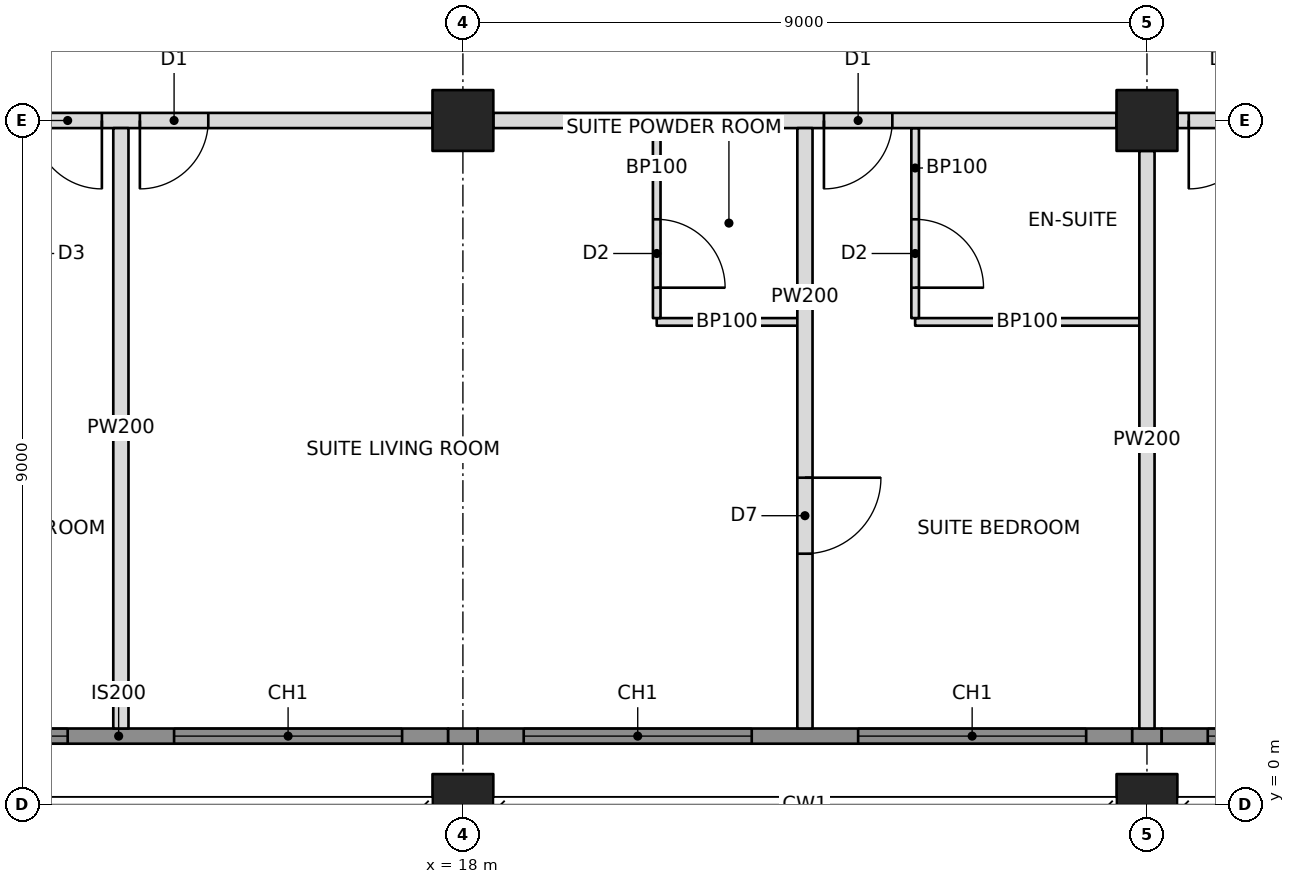
"""IFC4 building model, lengths in metres.
Left out: names, types, materials, properties, quantities, classifications, styles, units other than length and angle.
Written with IfcOpenShell. Run it as: python <this file> out.ifc"""

import sys

from ifc_helpers import new_model, si_unit, direction, frame, frame_2d, origin, origin_2d, place, context, subcontext, project, spatial, rectangle, hollow_rectangle, extrude, element, fill, save


model = new_model("IFC4")
c1 = context("Model", 3, precision=1e-05, world=origin(), true_north=direction((0.0, 1.0)))
c2 = subcontext(c1, "Body", "Model", "MODEL_VIEW")
j1 = project(units=[si_unit("LENGTHUNIT", "METRE"), si_unit("PLANEANGLEUNIT", "RADIAN")], contexts=[c1])
p1 = place(None, origin())
s1 = spatial("IfcSite", under=j1, at=p1, CompositionType="ELEMENT")
p2 = place(p1, origin())
s2 = spatial("IfcBuilding", under=s1, at=p2, CompositionType="ELEMENT")
p3 = place(p2, frame((0.0, 0.0, 201.2)))
s3 = spatial("IfcBuildingStorey", under=s2, at=p3, CompositionType="ELEMENT", Elevation=201.2)
p4 = place(p3, frame((18.0, 0.0, 0.0), z_axis=(0.0, 0.0, 1.0), x_axis=(1.0, 0.0, 0.0)))
e1 = element("IfcColumn", 1, at=p4, inside=s3, PredefinedType="COLUMN", context=c2, shape_type="SweptSolid", body=[
    extrude(hollow_rectangle(XDim=0.8, YDim=0.8, WallThickness=0.06, at=origin_2d()), origin(), (0.0, 0.0, 1.0), 3.4),
])
p5 = place(p3, frame((18.0, 9.0, 0.0), z_axis=(0.0, 0.0, 1.0), x_axis=(1.0, 0.0, 0.0)))
e2 = element("IfcColumn", 2, at=p5, inside=s3, PredefinedType="COLUMN", context=c2, shape_type="SweptSolid", body=[
    extrude(hollow_rectangle(XDim=0.8, YDim=0.8, WallThickness=0.05, at=origin_2d()), origin(), (0.0, 0.0, 1.0), 3.4),
])
p6 = place(p3, frame((27.0, 0.0, 0.0), z_axis=(0.0, 0.0, 1.0), x_axis=(1.0, 0.0, 0.0)))
e3 = element("IfcColumn", 3, at=p6, inside=s3, PredefinedType="COLUMN", context=c2, shape_type="SweptSolid", body=[
    extrude(hollow_rectangle(XDim=0.8, YDim=0.8, WallThickness=0.06, at=origin_2d()), origin(), (0.0, 0.0, 1.0), 3.4),
])
p7 = place(p3, frame((27.0, 9.0, 0.0), z_axis=(0.0, 0.0, 1.0), x_axis=(1.0, 0.0, 0.0)))
e4 = element("IfcColumn", 4, at=p7, inside=s3, PredefinedType="COLUMN", context=c2, shape_type="SweptSolid", body=[
    extrude(hollow_rectangle(XDim=0.8, YDim=0.8, WallThickness=0.05, at=origin_2d()), origin(), (0.0, 0.0, 1.0), 3.4),
])
p8 = place(p3, frame((9.4, 9.0, 0.0), z_axis=(0.0, 0.0, 1.0), x_axis=(1.0, 0.0, 0.0)))
e5 = element("IfcWall", 5, at=p8, inside=s3, PredefinedType="PARTITIONING", context=c2, shape_type="SweptSolid", body=[
    extrude(rectangle(XDim=8.2, YDim=0.2, at=frame_2d((4.1, 0.0))), origin(), (0.0, 0.0, 1.0), 2.405),
])
p9 = place(p8, frame((2.95, 0.0, 0.0)))
e6 = element("IfcOpeningElement", 6, at=p9, cuts=e5, PredefinedType="OPENING", context=c2, shape_type="SweptSolid", body=[
    extrude(rectangle(XDim=0.9, YDim=2.1, at=frame_2d((0.45, 1.05))), frame((0.0, 0.11, 0.0), z_axis=(0.0, -1.0, 0.0), x_axis=(1.0, 0.0, 0.0)), (0.0, 0.0, 1.0), 0.22),
])
p10 = place(p8, frame((4.35, 0.0, 0.0)))
e7 = element("IfcOpeningElement", 7, at=p10, cuts=e5, PredefinedType="OPENING", context=c2, shape_type="SweptSolid", body=[
    extrude(rectangle(XDim=0.9, YDim=2.1, at=frame_2d((0.45, 1.05))), frame((0.0, 0.11, 0.0), z_axis=(0.0, -1.0, 0.0), x_axis=(1.0, 0.0, 0.0)), (0.0, 0.0, 1.0), 0.22),
])
p11 = place(p3, frame((18.4, 9.0, 0.0), z_axis=(0.0, 0.0, 1.0), x_axis=(1.0, 0.0, 0.0)))
e8 = element("IfcWall", 8, at=p11, inside=s3, PredefinedType="PARTITIONING", context=c2, shape_type="SweptSolid", body=[
    extrude(rectangle(XDim=8.2, YDim=0.2, at=frame_2d((4.1, 0.0))), origin(), (0.0, 0.0, 1.0), 2.405),
])
p12 = place(p11, frame((4.35, 0.0, 0.0)))
e9 = element("IfcOpeningElement", 9, at=p12, cuts=e8, PredefinedType="OPENING", context=c2, shape_type="SweptSolid", body=[
    extrude(rectangle(XDim=0.9, YDim=2.1, at=frame_2d((0.45, 1.05))), frame((0.0, 0.11, 0.0), z_axis=(0.0, -1.0, 0.0), x_axis=(1.0, 0.0, 0.0)), (0.0, 0.0, 1.0), 0.22),
])
p13 = place(p3, frame((27.4, 9.0, 0.0), z_axis=(0.0, 0.0, 1.0), x_axis=(1.0, 0.0, 0.0)))
e10 = element("IfcWall", 10, at=p13, inside=s3, PredefinedType="PARTITIONING", context=c2, shape_type="SweptSolid", body=[
    extrude(rectangle(XDim=8.2, YDim=0.2, at=frame_2d((4.1, 0.0))), origin(), (0.0, 0.0, 1.0), 2.405),
])
p14 = place(p13, frame((0.15, 0.0, 0.0)))
e11 = element("IfcOpeningElement", 11, at=p14, cuts=e10, PredefinedType="OPENING", context=c2, shape_type="SweptSolid", body=[
    extrude(rectangle(XDim=0.9, YDim=2.1, at=frame_2d((0.45, 1.05))), frame((0.0, 0.11, 0.0), z_axis=(0.0, -1.0, 0.0), x_axis=(1.0, 0.0, 0.0)), (0.0, 0.0, 1.0), 0.22),
])
p15 = place(p3, frame((13.5, 8.9, 0.0), z_axis=(0.0, 0.0, 1.0), x_axis=(0.0, -1.0, 0.0)))
e12 = element("IfcWall", 12, at=p15, inside=s3, PredefinedType="PARTITIONING", context=c2, shape_type="SweptSolid", body=[
    extrude(rectangle(XDim=7.9, YDim=0.2, at=frame_2d((3.95, 0.0))), origin(), (0.0, 0.0, 1.0), 2.404),
])
p16 = place(p3, frame((22.5, 8.9, 0.0), z_axis=(0.0, 0.0, 1.0), x_axis=(0.0, -1.0, 0.0)))
e13 = element("IfcWall", 13, at=p16, inside=s3, PredefinedType="PARTITIONING", context=c2, shape_type="SweptSolid", body=[
    extrude(rectangle(XDim=7.9, YDim=0.2, at=frame_2d((3.95, 0.0))), origin(), (0.0, 0.0, 1.0), 2.404),
])
p17 = place(p16, frame((4.6, 0.0, 0.0)))
e14 = element("IfcOpeningElement", 14, at=p17, cuts=e13, PredefinedType="OPENING", context=c2, shape_type="SweptSolid", body=[
    extrude(rectangle(XDim=1.0, YDim=2.1, at=frame_2d((0.5, 1.05))), frame((0.0, 0.11, 0.0), z_axis=(0.0, -1.0, 0.0), x_axis=(1.0, 0.0, 0.0)), (0.0, 0.0, 1.0), 0.22),
])
p18 = place(p3, frame((27.0, 8.6, 0.0), z_axis=(0.0, 0.0, 1.0), x_axis=(0.0, -1.0, 0.0)))
e15 = element("IfcWall", 15, at=p18, inside=s3, PredefinedType="PARTITIONING", context=c2, shape_type="SweptSolid", body=[
    extrude(rectangle(XDim=7.6, YDim=0.2, at=frame_2d((3.8, 0.0))), origin(), (0.0, 0.0, 1.0), 2.405),
])
p19 = place(p3, frame((20.55, 6.35, 0.0), z_axis=(0.0, 0.0, 1.0), x_axis=(1.0, 0.0, 0.0)))
e16 = element("IfcWall", 16, at=p19, inside=s3, PredefinedType="PARTITIONING", context=c2, shape_type="SweptSolid", body=[
    extrude(rectangle(XDim=1.85, YDim=0.1, at=frame_2d((0.925, 0.0))), origin(), (0.0, 0.0, 1.0), 3.2),
])
p20 = place(p3, frame((20.55, 8.9, 0.0), z_axis=(0.0, 0.0, 1.0), x_axis=(0.0, -1.0, 0.0)))
e17 = element("IfcWall", 17, at=p20, inside=s3, PredefinedType="PARTITIONING", context=c2, shape_type="SweptSolid", body=[
    extrude(rectangle(XDim=2.5, YDim=0.1, at=frame_2d((1.25, 0.0))), origin(), (0.0, 0.0, 1.0), 2.404),
])
p21 = place(p20, frame((1.2, 0.0, 0.0)))
e18 = element("IfcOpeningElement", 18, at=p21, cuts=e17, PredefinedType="OPENING", context=c2, shape_type="SweptSolid", body=[
    extrude(rectangle(XDim=0.9, YDim=2.1, at=frame_2d((0.45, 1.05))), frame((0.0, 0.06, 0.0), z_axis=(0.0, -1.0, 0.0), x_axis=(1.0, 0.0, 0.0)), (0.0, 0.0, 1.0), 0.12),
])
p22 = place(p3, frame((23.95, 6.35, 0.0), z_axis=(0.0, 0.0, 1.0), x_axis=(1.0, 0.0, 0.0)))
e19 = element("IfcWall", 19, at=p22, inside=s3, PredefinedType="PARTITIONING", context=c2, shape_type="SweptSolid", body=[
    extrude(rectangle(XDim=2.95, YDim=0.1, at=frame_2d((1.475, 0.0))), origin(), (0.0, 0.0, 1.0), 2.404),
])
p23 = place(p3, frame((23.95, 8.9, 0.0), z_axis=(0.0, 0.0, 1.0), x_axis=(0.0, -1.0, 0.0)))
e20 = element("IfcWall", 20, at=p23, inside=s3, PredefinedType="PARTITIONING", context=c2, shape_type="SweptSolid", body=[
    extrude(rectangle(XDim=2.5, YDim=0.1, at=frame_2d((1.25, 0.0))), origin(), (0.0, 0.0, 1.0), 2.404),
])
p24 = place(p23, frame((1.2, 0.0, 0.0)))
e21 = element("IfcOpeningElement", 21, at=p24, cuts=e20, PredefinedType="OPENING", context=c2, shape_type="SweptSolid", body=[
    extrude(rectangle(XDim=0.9, YDim=2.1, at=frame_2d((0.45, 1.05))), frame((0.0, 0.06, 0.0), z_axis=(0.0, -1.0, 0.0), x_axis=(1.0, 0.0, 0.0)), (0.0, 0.0, 1.0), 0.12),
])
p25 = place(p3, frame((9.135, 0.9, 0.0), z_axis=(0.0, 0.0, 1.0), x_axis=(1.0, 0.0, 0.0)))
e22 = element("IfcWall", 22, at=p25, inside=s3, PredefinedType="SOLIDWALL", context=c2, shape_type="SweptSolid", body=[
    extrude(rectangle(XDim=8.671, YDim=0.2, at=frame_2d((4.335, 0.0))), origin(), (0.0, 0.0, 1.0), 3.2),
])
p26 = place(p25, frame((0.665, 0.0, 0.6)))
e23 = element("IfcOpeningElement", 23, at=p26, cuts=e22, PredefinedType="OPENING", context=c2, shape_type="SweptSolid", body=[
    extrude(rectangle(XDim=3.0, YDim=2.2, at=frame_2d((1.5, 1.1))), frame((0.0, 0.11, 0.0), z_axis=(0.0, -1.0, 0.0), x_axis=(1.0, 0.0, 0.0)), (0.0, 0.0, 1.0), 0.22),
])
p27 = place(p25, frame((5.065, 0.0, 0.6)))
e24 = element("IfcOpeningElement", 24, at=p27, cuts=e22, PredefinedType="OPENING", context=c2, shape_type="SweptSolid", body=[
    extrude(rectangle(XDim=3.0, YDim=2.2, at=frame_2d((1.5, 1.1))), frame((0.0, 0.11, 0.0), z_axis=(0.0, -1.0, 0.0), x_axis=(1.0, 0.0, 0.0)), (0.0, 0.0, 1.0), 0.22),
])
p28 = place(p3, frame((17.806, 0.9, 0.0), z_axis=(0.0, 0.0, 1.0), x_axis=(1.0, 0.0, 0.0)))
e25 = element("IfcWall", 25, at=p28, inside=s3, PredefinedType="SOLIDWALL", context=c2, shape_type="SweptSolid", body=[
    extrude(rectangle(XDim=0.388, YDim=0.2, at=frame_2d((0.194, 0.0))), origin(), (0.0, 0.0, 1.0), 2.404),
])
p29 = place(p3, frame((18.194, 0.9, 0.0), z_axis=(0.0, 0.0, 1.0), x_axis=(1.0, 0.0, 0.0)))
e26 = element("IfcWall", 26, at=p29, inside=s3, PredefinedType="SOLIDWALL", context=c2, shape_type="SweptSolid", body=[
    extrude(rectangle(XDim=8.612, YDim=0.2, at=frame_2d((4.306, 0.0))), origin(), (0.0, 0.0, 1.0), 3.2),
])
p30 = place(p29, frame((0.606, 0.0, 0.6)))
e27 = element("IfcOpeningElement", 27, at=p30, cuts=e26, PredefinedType="OPENING", context=c2, shape_type="SweptSolid", body=[
    extrude(rectangle(XDim=3.0, YDim=2.2, at=frame_2d((1.5, 1.1))), frame((0.0, 0.11, 0.0), z_axis=(0.0, -1.0, 0.0), x_axis=(1.0, 0.0, 0.0)), (0.0, 0.0, 1.0), 0.22),
])
p31 = place(p29, frame((5.006, 0.0, 0.6)))
e28 = element("IfcOpeningElement", 28, at=p31, cuts=e26, PredefinedType="OPENING", context=c2, shape_type="SweptSolid", body=[
    extrude(rectangle(XDim=3.0, YDim=2.2, at=frame_2d((1.5, 1.1))), frame((0.0, 0.11, 0.0), z_axis=(0.0, -1.0, 0.0), x_axis=(1.0, 0.0, 0.0)), (0.0, 0.0, 1.0), 0.22),
])
p32 = place(p3, frame((26.806, 0.9, 0.0), z_axis=(0.0, 0.0, 1.0), x_axis=(1.0, 0.0, 0.0)))
e29 = element("IfcWall", 29, at=p32, inside=s3, PredefinedType="SOLIDWALL", context=c2, shape_type="SweptSolid", body=[
    extrude(rectangle(XDim=0.388, YDim=0.2, at=frame_2d((0.194, 0.0))), origin(), (0.0, 0.0, 1.0), 2.404),
])
p33 = place(p3, frame((27.194, 0.9, 0.0), z_axis=(0.0, 0.0, 1.0), x_axis=(1.0, 0.0, 0.0)))
e30 = element("IfcWall", 30, at=p33, inside=s3, PredefinedType="SOLIDWALL", context=c2, shape_type="SweptSolid", body=[
    extrude(rectangle(XDim=8.671, YDim=0.2, at=frame_2d((4.335, 0.0))), origin(), (0.0, 0.0, 1.0), 3.2),
])
p34 = place(p33, frame((0.606, 0.0, 0.6)))
e31 = element("IfcOpeningElement", 31, at=p34, cuts=e30, PredefinedType="OPENING", context=c2, shape_type="SweptSolid", body=[
    extrude(rectangle(XDim=3.0, YDim=2.2, at=frame_2d((1.5, 1.1))), frame((0.0, 0.11, 0.0), z_axis=(0.0, -1.0, 0.0), x_axis=(1.0, 0.0, 0.0)), (0.0, 0.0, 1.0), 0.22),
])
p35 = place(p33, frame((5.006, 0.0, 0.6)))
e32 = element("IfcOpeningElement", 32, at=p35, cuts=e30, PredefinedType="OPENING", context=c2, shape_type="SweptSolid", body=[
    extrude(rectangle(XDim=3.0, YDim=2.2, at=frame_2d((1.5, 1.1))), frame((0.0, 0.11, 0.0), z_axis=(0.0, -1.0, 0.0), x_axis=(1.0, 0.0, 0.0)), (0.0, 0.0, 1.0), 0.22),
])
p36 = place(p26, origin())
e33 = element("IfcWindow", 33, at=p36, inside=s3, PartitioningType="TRIPLE_PANEL_VERTICAL", PredefinedType="WINDOW", context=c2, shape_type="SweptSolid", body=[
    extrude(rectangle(XDim=3.0, YDim=2.2, at=frame_2d((1.5, 1.1))), frame((0.0, 0.03, 0.0), z_axis=(0.0, -1.0, 0.0), x_axis=(1.0, 0.0, 0.0)), (0.0, 0.0, 1.0), 0.06),
])
fill(e23, e33)
p37 = place(p27, origin())
e34 = element("IfcWindow", 34, at=p37, inside=s3, PartitioningType="TRIPLE_PANEL_VERTICAL", PredefinedType="WINDOW", context=c2, shape_type="SweptSolid", body=[
    extrude(rectangle(XDim=3.0, YDim=2.2, at=frame_2d((1.5, 1.1))), frame((0.0, 0.03, 0.0), z_axis=(0.0, -1.0, 0.0), x_axis=(1.0, 0.0, 0.0)), (0.0, 0.0, 1.0), 0.06),
])
fill(e24, e34)
p38 = place(p30, origin())
e35 = element("IfcWindow", 35, at=p38, inside=s3, PartitioningType="TRIPLE_PANEL_VERTICAL", PredefinedType="WINDOW", context=c2, shape_type="SweptSolid", body=[
    extrude(rectangle(XDim=3.0, YDim=2.2, at=frame_2d((1.5, 1.1))), frame((0.0, 0.03, 0.0), z_axis=(0.0, -1.0, 0.0), x_axis=(1.0, 0.0, 0.0)), (0.0, 0.0, 1.0), 0.06),
])
fill(e27, e35)
p39 = place(p31, origin())
e36 = element("IfcWindow", 36, at=p39, inside=s3, PartitioningType="TRIPLE_PANEL_VERTICAL", PredefinedType="WINDOW", context=c2, shape_type="SweptSolid", body=[
    extrude(rectangle(XDim=3.0, YDim=2.2, at=frame_2d((1.5, 1.1))), frame((0.0, 0.03, 0.0), z_axis=(0.0, -1.0, 0.0), x_axis=(1.0, 0.0, 0.0)), (0.0, 0.0, 1.0), 0.06),
])
fill(e28, e36)
p40 = place(p34, origin())
e37 = element("IfcWindow", 37, at=p40, inside=s3, PartitioningType="TRIPLE_PANEL_VERTICAL", PredefinedType="WINDOW", context=c2, shape_type="SweptSolid", body=[
    extrude(rectangle(XDim=3.0, YDim=2.2, at=frame_2d((1.5, 1.1))), frame((0.0, 0.03, 0.0), z_axis=(0.0, -1.0, 0.0), x_axis=(1.0, 0.0, 0.0)), (0.0, 0.0, 1.0), 0.06),
])
fill(e31, e37)
p41 = place(p17, origin())
e38 = element("IfcDoor", 38, at=p41, inside=s3, OperationType="SINGLE_SWING_LEFT", PredefinedType="DOOR", context=c2, shape_type="SweptSolid", body=[
    extrude(rectangle(XDim=1.0, YDim=2.1, at=frame_2d((0.5, 1.05))), frame((0.0, 0.025, 0.0), z_axis=(0.0, -1.0, 0.0), x_axis=(1.0, 0.0, 0.0)), (0.0, 0.0, 1.0), 0.05),
])
fill(e14, e38)
p42 = place(p9, frame((0.9, 0.0, 0.0), z_axis=(0.0, 0.0, 1.0), x_axis=(-1.0, 0.0, 0.0)))
e39 = element("IfcDoor", 39, at=p42, inside=s3, OperationType="SINGLE_SWING_LEFT", PredefinedType="DOOR", context=c2, shape_type="SweptSolid", body=[
    extrude(rectangle(XDim=0.9, YDim=2.1, at=frame_2d((0.45, 1.05))), frame((0.0, 0.025, 0.0), z_axis=(0.0, -1.0, 0.0), x_axis=(1.0, 0.0, 0.0)), (0.0, 0.0, 1.0), 0.05),
])
fill(e6, e39)
p43 = place(p21, origin())
e40 = element("IfcDoor", 40, at=p43, inside=s3, OperationType="SINGLE_SWING_RIGHT", PredefinedType="DOOR", context=c2, shape_type="SweptSolid", body=[
    extrude(rectangle(XDim=0.9, YDim=2.1, at=frame_2d((0.45, 1.05))), frame((0.0, 0.025, 0.0), z_axis=(0.0, -1.0, 0.0), x_axis=(1.0, 0.0, 0.0)), (0.0, 0.0, 1.0), 0.05),
])
fill(e18, e40)
p44 = place(p10, frame((0.9, 0.0, 0.0), z_axis=(0.0, 0.0, 1.0), x_axis=(-1.0, 0.0, 0.0)))
e41 = element("IfcDoor", 41, at=p44, inside=s3, OperationType="SINGLE_SWING_RIGHT", PredefinedType="DOOR", context=c2, shape_type="SweptSolid", body=[
    extrude(rectangle(XDim=0.9, YDim=2.1, at=frame_2d((0.45, 1.05))), frame((0.0, 0.025, 0.0), z_axis=(0.0, -1.0, 0.0), x_axis=(1.0, 0.0, 0.0)), (0.0, 0.0, 1.0), 0.05),
])
fill(e7, e41)
p45 = place(p24, origin())
e42 = element("IfcDoor", 42, at=p45, inside=s3, OperationType="SINGLE_SWING_RIGHT", PredefinedType="DOOR", context=c2, shape_type="SweptSolid", body=[
    extrude(rectangle(XDim=0.9, YDim=2.1, at=frame_2d((0.45, 1.05))), frame((0.0, 0.025, 0.0), z_axis=(0.0, -1.0, 0.0), x_axis=(1.0, 0.0, 0.0)), (0.0, 0.0, 1.0), 0.05),
])
fill(e21, e42)
p46 = place(p12, frame((0.9, 0.0, 0.0), z_axis=(0.0, 0.0, 1.0), x_axis=(-1.0, 0.0, 0.0)))
e43 = element("IfcDoor", 43, at=p46, inside=s3, OperationType="SINGLE_SWING_RIGHT", PredefinedType="DOOR", context=c2, shape_type="SweptSolid", body=[
    extrude(rectangle(XDim=0.9, YDim=2.1, at=frame_2d((0.45, 1.05))), frame((0.0, 0.025, 0.0), z_axis=(0.0, -1.0, 0.0), x_axis=(1.0, 0.0, 0.0)), (0.0, 0.0, 1.0), 0.05),
])
fill(e9, e43)
p47 = place(p14, frame((0.9, 0.0, 0.0), z_axis=(0.0, 0.0, 1.0), x_axis=(-1.0, 0.0, 0.0)))
e44 = element("IfcDoor", 44, at=p47, inside=s3, OperationType="SINGLE_SWING_RIGHT", PredefinedType="DOOR", context=c2, shape_type="SweptSolid", body=[
    extrude(rectangle(XDim=0.9, YDim=2.1, at=frame_2d((0.45, 1.05))), frame((0.0, 0.025, 0.0), z_axis=(0.0, -1.0, 0.0), x_axis=(1.0, 0.0, 0.0)), (0.0, 0.0, 1.0), 0.05),
])
fill(e11, e44)
save(model, sys.argv[1])
